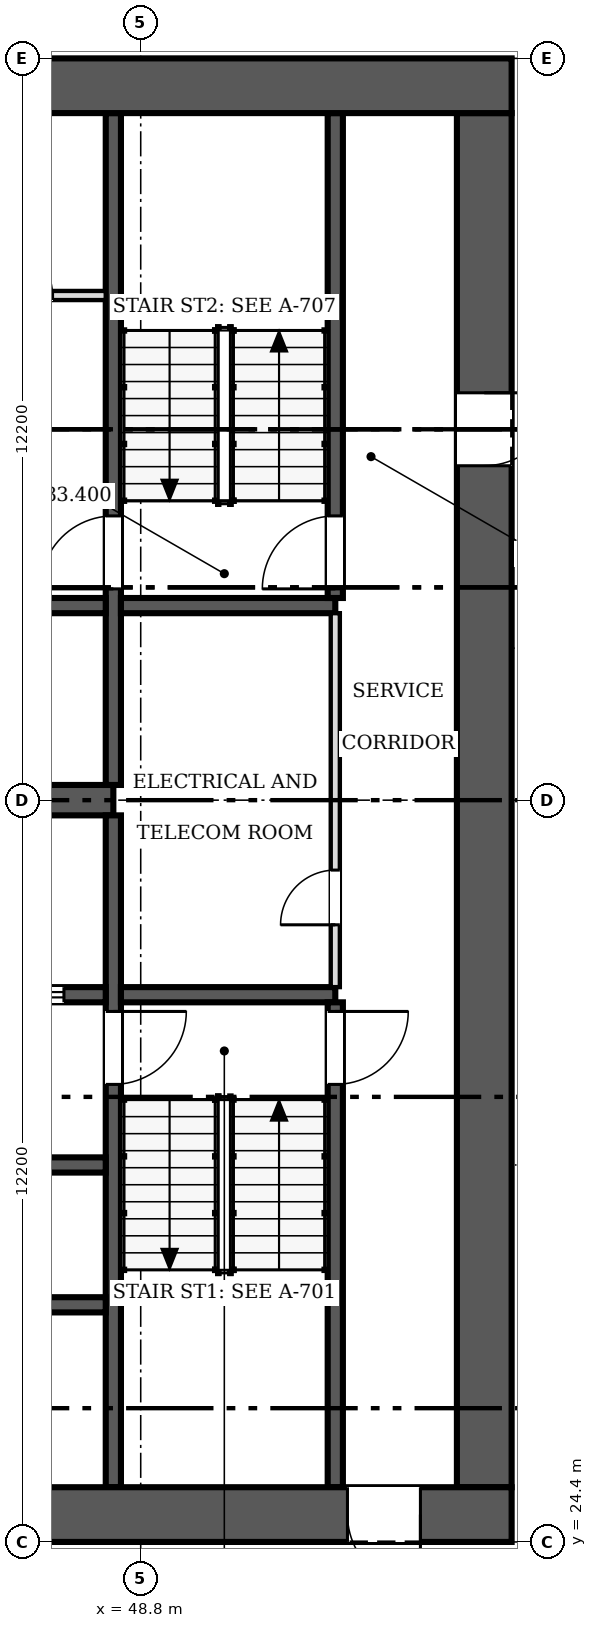
"""IFC4 building model, lengths in metres.
Left out: names, types, materials, properties, quantities, classifications, styles, units other than length and angle.
Written with IfcOpenShell. Run it as: python <this file> out.ifc"""

import sys

from ifc_helpers import new_model, si_unit, direction, frame, frame_2d, origin, place, context, subcontext, project, spatial, rectangle, extrude, source, transform, mapped, element, fill, save


model = new_model("IFC4")
c1 = context("Model", 3, precision=1e-05, world=origin(), true_north=direction((0.0, 1.0)))
c2 = subcontext(c1, "Body", "Model", "MODEL_VIEW")
j1 = project(units=[si_unit("LENGTHUNIT", "METRE"), si_unit("PLANEANGLEUNIT", "RADIAN")], contexts=[c1])
p1 = place(None, origin())
s1 = spatial("IfcSite", under=j1, at=p1, CompositionType="ELEMENT")
p2 = place(p1, origin())
s2 = spatial("IfcBuilding", under=s1, at=p2, CompositionType="ELEMENT")
p3 = place(p2, frame((0.0, 0.0, 33.4)))
s3 = spatial("IfcBuildingStorey", under=s2, at=p3, CompositionType="ELEMENT", Elevation=33.4)
p4 = place(p3, frame((54.9, 24.85, 0.0), z_axis=(0.0, 0.0, 1.0), x_axis=(-1.0, 0.0, 0.0)))
e1 = element("IfcWall", 1, at=p4, inside=s3, PredefinedType="SHEAR", context=c2, shape_type="SweptSolid", body=[
    extrude(rectangle(XDim=24.4, YDim=0.9, at=frame_2d((12.2, 0.0))), origin(), (0.0, 0.0, 1.0), 3.8),
])
m1 = source(origin(), c2, "Body", "SweptSolid", [
    extrude(rectangle(XDim=1.2, YDim=2.1, at=frame_2d((0.6, 1.05))), frame((0.0, 0.46, 0.0), z_axis=(0.0, -1.0, 0.0), x_axis=(1.0, 0.0, 0.0)), (0.0, 0.0, 1.0), 0.92),
])
p5 = place(p4, frame((1.5, 0.0, 0.0)))
e2 = element("IfcOpeningElement", 2, at=p5, cuts=e1, PredefinedType="OPENING", context=c2, shape_type="MappedRepresentation", body=[
    mapped(m1, transform((0.0, 0.0, 0.0), scale=1.0)),
])
p6 = place(p3, frame((30.5, 48.35, 0.0), z_axis=(0.0, 0.0, 1.0), x_axis=(1.0, 0.0, 0.0)))
e3 = element("IfcWall", 3, at=p6, inside=s3, PredefinedType="SHEAR", context=c2, shape_type="SweptSolid", body=[
    extrude(rectangle(XDim=24.4, YDim=0.9, at=frame_2d((12.2, 0.0))), origin(), (0.0, 0.0, 1.0), 3.8),
])
p7 = place(p3, frame((54.45, 47.9, 0.0), z_axis=(0.0, 0.0, 1.0), x_axis=(0.0, -1.0, 0.0)))
e4 = element("IfcWall", 4, at=p7, inside=s3, PredefinedType="SHEAR", context=c2, shape_type="SweptSolid", body=[
    extrude(rectangle(XDim=22.6, YDim=0.9, at=frame_2d((11.3, 0.0))), origin(), (0.0, 0.0, 1.0), 3.8),
])
p8 = place(p7, frame((4.6, 0.0, 0.0)))
e5 = element("IfcOpeningElement", 5, at=p8, cuts=e4, PredefinedType="OPENING", context=c2, shape_type="MappedRepresentation", body=[
    mapped(m1, transform((0.0, 0.0, 0.0), scale=1.0)),
])
p9 = place(p3, frame((31.4, 36.6, 0.0), z_axis=(0.0, 0.0, 1.0), x_axis=(1.0, 0.0, 0.0)))
e6 = element("IfcWall", 6, at=p9, inside=s3, PredefinedType="SHEAR", context=c2, shape_type="SweptSolid", body=[
    extrude(rectangle(XDim=16.95, YDim=0.5, at=frame_2d((8.475, 0.0))), origin(), (0.0, 0.0, 1.0), 3.8),
])
p10 = place(p3, frame((48.35, 36.35, 0.0), z_axis=(0.0, 0.0, 1.0), x_axis=(0.0, -1.0, 0.0)))
e7 = element("IfcWall", 7, at=p10, inside=s3, PredefinedType="SOLIDWALL", context=c2, shape_type="SweptSolid", body=[
    extrude(rectangle(XDim=11.05, YDim=0.25, at=frame_2d((5.525, 0.0))), origin(), (0.0, 0.0, 1.0), 3.8),
])
m2 = source(origin(), c2, "Body", "SweptSolid", [
    extrude(rectangle(XDim=1.2, YDim=2.1, at=frame_2d((0.6, 1.05))), frame((0.0, 0.135, 0.0), z_axis=(0.0, -1.0, 0.0), x_axis=(1.0, 0.0, 0.0)), (0.0, 0.0, 1.0), 0.27),
])
p11 = place(p10, frame((3.225, 0.0, 0.0)))
e8 = element("IfcOpeningElement", 8, at=p11, cuts=e7, PredefinedType="OPENING", context=c2, shape_type="MappedRepresentation", body=[
    mapped(m2, transform((0.0, 0.0, 0.0), scale=1.0)),
])
p12 = place(p3, frame((48.35, 47.9, 0.0), z_axis=(0.0, 0.0, 1.0), x_axis=(0.0, -1.0, 0.0)))
e9 = element("IfcWall", 9, at=p12, inside=s3, PredefinedType="SOLIDWALL", context=c2, shape_type="SweptSolid", body=[
    extrude(rectangle(XDim=11.05, YDim=0.25, at=frame_2d((5.525, 0.0))), origin(), (0.0, 0.0, 1.0), 3.8),
])
p13 = place(p12, frame((6.625, 0.0, 0.0)))
e10 = element("IfcOpeningElement", 10, at=p13, cuts=e9, PredefinedType="OPENING", context=c2, shape_type="MappedRepresentation", body=[
    mapped(m2, transform((0.0, 0.0, 0.0), scale=1.0)),
])
p14 = place(p3, frame((48.225, 33.4, 0.0), z_axis=(0.0, 0.0, 1.0), x_axis=(-1.0, 0.0, 0.0)))
e11 = element("IfcWall", 11, at=p14, inside=s3, PredefinedType="SOLIDWALL", context=c2, shape_type="SweptSolid", body=[
    extrude(rectangle(XDim=5.275, YDim=0.25, at=frame_2d((2.638, 0.0))), origin(), (0.0, 0.0, 1.0), 3.8),
])
p15 = place(p14, frame((3.512, 0.0, 0.0)))
e12 = element("IfcOpeningElement", 12, at=p15, cuts=e11, PredefinedType="OPENING", context=c2, shape_type="MappedRepresentation", body=[
    mapped(m2, transform((0.0, 0.0, 0.0), scale=1.0)),
])
p16 = place(p14, frame((0.688, 0.0, 0.0)))
e13 = element("IfcOpeningElement", 13, at=p16, cuts=e11, PredefinedType="OPENING", context=c2, shape_type="MappedRepresentation", body=[
    mapped(m2, transform((0.0, 0.0, 0.0), scale=1.0)),
])
p17 = place(p3, frame((48.475, 33.4, 0.0), z_axis=(0.0, 0.0, 1.0), x_axis=(1.0, 0.0, 0.0)))
e14 = element("IfcWall", 14, at=p17, inside=s3, PredefinedType="SOLIDWALL", context=c2, shape_type="SweptSolid", body=[
    extrude(rectangle(XDim=3.525, YDim=0.25, at=frame_2d((1.762, 0.0))), origin(), (0.0, 0.0, 1.0), 3.8),
])
for number, where, z_axis, x_axis in (
    (15, (42.95, 28.3, 0.0), (0.0, 0.0, 1.0), (1.0, 0.0, 0.0)),
    (16, (42.95, 39.8, 0.0), (0.0, 0.0, 1.0), (1.0, 0.0, 0.0)),
):
    element("IfcWall", number, at=place(p3, frame(where, z_axis=z_axis, x_axis=x_axis)), inside=s3, PredefinedType="SOLIDWALL", context=c2, shape_type="SweptSolid", body=[
        extrude(rectangle(XDim=5.275, YDim=0.25, at=frame_2d((2.638, 0.0))), origin(), (0.0, 0.0, 1.0), 3.8),
    ])
p18 = place(p3, frame((48.475, 39.8, 0.0), z_axis=(0.0, 0.0, 1.0), x_axis=(1.0, 0.0, 0.0)))
e17 = element("IfcWall", 17, at=p18, inside=s3, PredefinedType="SOLIDWALL", context=c2, shape_type="SweptSolid", body=[
    extrude(rectangle(XDim=3.525, YDim=0.25, at=frame_2d((1.762, 0.0))), origin(), (0.0, 0.0, 1.0), 3.8),
])
p19 = place(p3, frame((52.0, 25.3, 0.0), z_axis=(0.0, 0.0, 1.0), x_axis=(0.0, 1.0, 0.0)))
e18 = element("IfcWall", 18, at=p19, inside=s3, PredefinedType="SOLIDWALL", context=c2, shape_type="SweptSolid", body=[
    extrude(rectangle(XDim=7.975, YDim=0.25, at=frame_2d((3.987, 0.0))), origin(), (0.0, 0.0, 1.0), 3.8),
])
p20 = place(p19, frame((6.625, 0.0, 0.0)))
e19 = element("IfcOpeningElement", 19, at=p20, cuts=e18, PredefinedType="OPENING", context=c2, shape_type="MappedRepresentation", body=[
    mapped(m2, transform((0.0, 0.0, 0.0), scale=1.0)),
])
p21 = place(p3, frame((52.0, 39.925, 0.0), z_axis=(0.0, 0.0, 1.0), x_axis=(0.0, 1.0, 0.0)))
e20 = element("IfcWall", 20, at=p21, inside=s3, PredefinedType="SOLIDWALL", context=c2, shape_type="SweptSolid", body=[
    extrude(rectangle(XDim=7.975, YDim=0.25, at=frame_2d((3.987, 0.0))), origin(), (0.0, 0.0, 1.0), 3.8),
])
p22 = place(p21, frame((0.15, 0.0, 0.0)))
e21 = element("IfcOpeningElement", 21, at=p22, cuts=e20, PredefinedType="OPENING", context=c2, shape_type="MappedRepresentation", body=[
    mapped(m2, transform((0.0, 0.0, 0.0), scale=1.0)),
])
p23 = place(p3, frame((42.95, 30.6, 0.0), z_axis=(0.0, 0.0, 1.0), x_axis=(1.0, 0.0, 0.0)))
e22 = element("IfcWall", 22, at=p23, inside=s3, PredefinedType="SOLIDWALL", context=c2, shape_type="SweptSolid", body=[
    extrude(rectangle(XDim=5.275, YDim=0.25, at=frame_2d((2.638, 0.0))), origin(), (0.0, 0.0, 1.0), 3.8),
])
p24 = place(p3, frame((52.0, 33.525, 0.0), z_axis=(0.0, 0.0, 1.0), x_axis=(0.0, 1.0, 0.0)))
e23 = element("IfcWall", 23, at=p24, inside=s3, PredefinedType="PARTITIONING", context=c2, shape_type="SweptSolid", body=[
    extrude(rectangle(XDim=6.15, YDim=0.15, at=frame_2d((3.075, 0.0))), origin(), (0.0, 0.0, 1.0), 3.6),
])
m3 = source(origin(), c2, "Body", "SweptSolid", [
    extrude(rectangle(XDim=0.9, YDim=2.1, at=frame_2d((0.45, 1.05))), frame((0.0, 0.085, 0.0), z_axis=(0.0, -1.0, 0.0), x_axis=(1.0, 0.0, 0.0)), (0.0, 0.0, 1.0), 0.17),
])
p25 = place(p24, frame((1.025, 0.0, 0.0)))
e24 = element("IfcOpeningElement", 24, at=p25, cuts=e23, PredefinedType="OPENING", context=c2, shape_type="MappedRepresentation", body=[
    mapped(m3, transform((0.0, 0.0, 0.0), scale=1.0)),
])
p26 = place(p3, frame((45.65, 44.9, 0.0), z_axis=(0.0, 0.0, 1.0), x_axis=(1.0, 0.0, 0.0)))
e25 = element("IfcWall", 25, at=p26, inside=s3, PredefinedType="PARTITIONING", context=c2, shape_type="SweptSolid", body=[
    extrude(rectangle(XDim=2.575, YDim=0.15, at=frame_2d((1.288, 0.0))), origin(), (0.0, 0.0, 1.0), 3.6),
])
p27 = place(p26, frame((0.8, 0.0, 0.0)))
e26 = element("IfcOpeningElement", 26, at=p27, cuts=e25, PredefinedType="OPENING", context=c2, shape_type="MappedRepresentation", body=[
    mapped(m3, transform((0.0, 0.0, 0.0), scale=1.0)),
])
m4 = source(origin(), c2, "Body", "SweptSolid", [
    extrude(rectangle(XDim=1.2, YDim=2.1, at=frame_2d((0.6, 1.05))), frame((0.0, 0.025, 0.0), z_axis=(0.0, -1.0, 0.0), x_axis=(1.0, 0.0, 0.0)), (0.0, 0.0, 1.0), 0.05),
])
p28 = place(p5, origin())
e27 = element("IfcDoor", 27, at=p28, inside=s3, OperationType="SINGLE_SWING_LEFT", PredefinedType="DOOR", context=c2, shape_type="MappedRepresentation", body=[
    mapped(m4, transform((0.0, 0.0, 0.0), scale=1.0)),
])
fill(e2, e27)
p29 = place(p8, origin())
e28 = element("IfcDoor", 28, at=p29, inside=s3, OperationType="SINGLE_SWING_LEFT", PredefinedType="DOOR", context=c2, shape_type="MappedRepresentation", body=[
    mapped(m4, transform((0.0, 0.0, 0.0), scale=1.0)),
])
fill(e5, e28)
p30 = place(p11, origin())
e29 = element("IfcDoor", 29, at=p30, inside=s3, OperationType="SINGLE_SWING_LEFT", PredefinedType="DOOR", context=c2, shape_type="MappedRepresentation", body=[
    mapped(m4, transform((0.0, 0.0, 0.0), scale=1.0)),
])
fill(e8, e29)
p31 = place(p13, origin())
e30 = element("IfcDoor", 30, at=p31, inside=s3, OperationType="SINGLE_SWING_RIGHT", PredefinedType="DOOR", context=c2, shape_type="MappedRepresentation", body=[
    mapped(m4, transform((0.0, 0.0, 0.0), scale=1.0)),
])
fill(e10, e30)
p32 = place(p16, origin())
e31 = element("IfcDoor", 31, at=p32, inside=s3, OperationType="DOUBLE_DOOR_SLIDING", PredefinedType="DOOR", context=c2, shape_type="MappedRepresentation", body=[
    mapped(m4, transform((0.0, 0.0, 0.0), scale=1.0)),
])
fill(e13, e31)
p33 = place(p20, origin())
e32 = element("IfcDoor", 32, at=p33, inside=s3, OperationType="SINGLE_SWING_RIGHT", PredefinedType="DOOR", context=c2, shape_type="MappedRepresentation", body=[
    mapped(m4, transform((0.0, 0.0, 0.0), scale=1.0)),
])
fill(e19, e32)
p34 = place(p22, origin())
e33 = element("IfcDoor", 33, at=p34, inside=s3, OperationType="SINGLE_SWING_LEFT", PredefinedType="DOOR", context=c2, shape_type="MappedRepresentation", body=[
    mapped(m4, transform((0.0, 0.0, 0.0), scale=1.0)),
])
fill(e21, e33)
m5 = source(origin(), c2, "Body", "SweptSolid", [
    extrude(rectangle(XDim=0.9, YDim=2.1, at=frame_2d((0.45, 1.05))), frame((0.0, 0.025, 0.0), z_axis=(0.0, -1.0, 0.0), x_axis=(1.0, 0.0, 0.0)), (0.0, 0.0, 1.0), 0.05),
])
p35 = place(p25, origin())
e34 = element("IfcDoor", 34, at=p35, inside=s3, OperationType="SINGLE_SWING_LEFT", PredefinedType="DOOR", context=c2, shape_type="MappedRepresentation", body=[
    mapped(m5, transform((0.0, 0.0, 0.0), scale=1.0)),
])
fill(e24, e34)
save(model, sys.argv[1])
